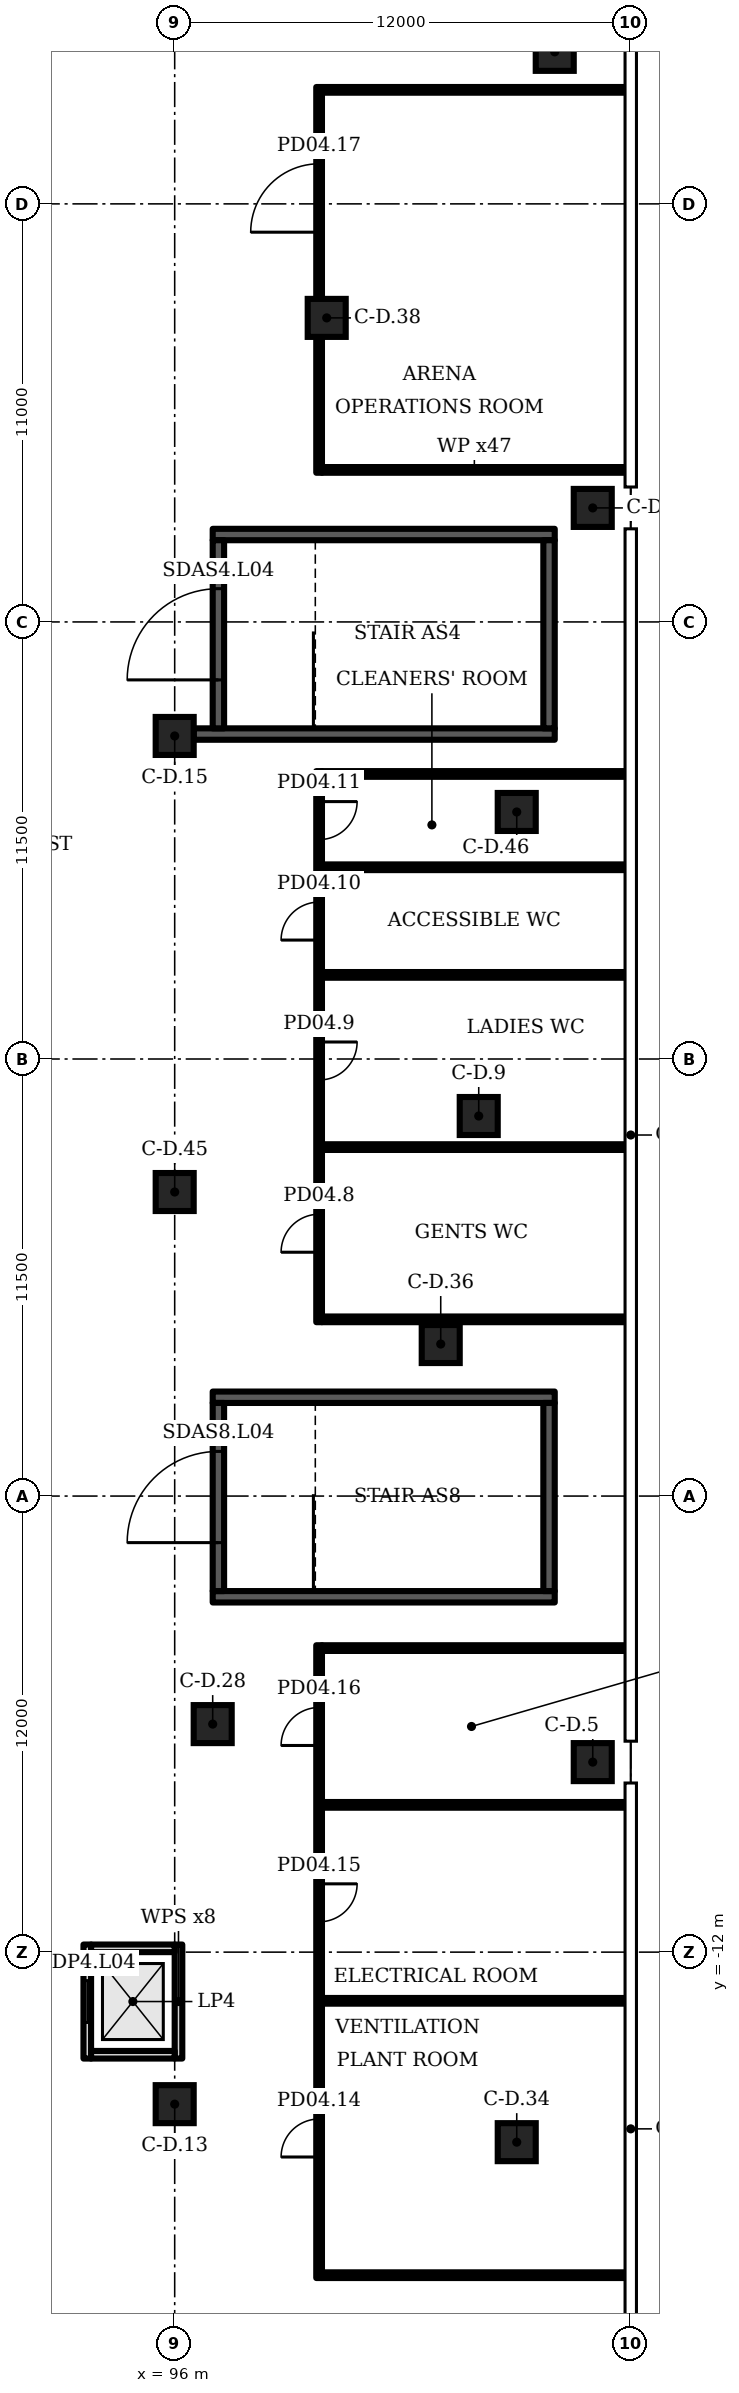
"""IFC4 building model, lengths in metres.
Left out: names, types, materials, properties, quantities, classifications, styles, units other than length and angle.
Written with IfcOpenShell. Run it as: python <this file> out.ifc"""

import sys

from ifc_helpers import new_model, si_unit, direction, frame, frame_2d, origin, origin_2d, place, context, subcontext, project, spatial, rectangle, extrude, element, fill, save


model = new_model("IFC4")
c1 = context("Model", 3, precision=1e-05, world=origin(), true_north=direction((0.0, 1.0)))
c2 = subcontext(c1, "Body", "Model", "MODEL_VIEW")
j1 = project(units=[si_unit("LENGTHUNIT", "METRE"), si_unit("PLANEANGLEUNIT", "RADIAN")], contexts=[c1])
p1 = place(None, origin())
s1 = spatial("IfcSite", under=j1, at=p1, CompositionType="ELEMENT")
p2 = place(p1, origin())
s2 = spatial("IfcBuilding", under=s1, at=p2, CompositionType="ELEMENT")
p3 = place(p2, frame((0.0, 0.0, 27.5)))
s3 = spatial("IfcBuildingStorey", under=s2, at=p3, CompositionType="ELEMENT", Elevation=27.5)
for number, where, z_axis, x_axis in (
    (1, (107.0, 26.0, 0.0), (0.0, 0.0, 1.0), (1.0, 0.0, 0.0)),
    (2, (107.0, -7.0, 0.0), (0.0, 0.0, 1.0), (1.0, 0.0, 0.0)),
    (3, (104.0, 10.0, 0.0), (0.0, 0.0, 1.0), (1.0, 0.0, 0.0)),
    (4, (96.0, -16.0, 0.0), (0.0, 0.0, 1.0), (1.0, 0.0, 0.0)),
    (5, (96.0, 20.0, 0.0), (0.0, 0.0, 1.0), (1.0, 0.0, 0.0)),
    (6, (106.0, 38.0, 0.0), (0.0, 0.0, 1.0), (1.0, 0.0, 0.0)),
    (7, (97.0, -6.0, 0.0), (0.0, 0.0, 1.0), (1.0, 0.0, 0.0)),
    (8, (105.0, -17.0, 0.0), (0.0, 0.0, 1.0), (1.0, 0.0, 0.0)),
    (9, (103.0, 4.0, 0.0), (0.0, 0.0, 1.0), (1.0, 0.0, 0.0)),
    (10, (100.0, 31.0, 0.0), (0.0, 0.0, 1.0), (1.0, 0.0, 0.0)),
    (11, (96.0, 8.0, 0.0), (0.0, 0.0, 1.0), (1.0, 0.0, 0.0)),
    (12, (105.0, 18.0, 0.0), (0.0, 0.0, 1.0), (1.0, 0.0, 0.0)),
):
    element("IfcColumn", number, at=place(p3, frame(where, z_axis=z_axis, x_axis=x_axis)), inside=s3, PredefinedType="COLUMN", context=c2, shape_type="SweptSolid", body=[
        extrude(rectangle(XDim=1.0, YDim=1.0, at=origin_2d()), origin(), (0.0, 0.0, 1.0), 5.5),
    ])
for number, where, z_axis, x_axis in (
    (13, (99.875, -20.5, 0.0), (0.0, 0.0, 1.0), (1.0, 0.0, 0.0)),
    (14, (99.875, -4.0, 0.0), (0.0, 0.0, 1.0), (1.0, 0.0, 0.0)),
    (15, (99.875, 19.0, 0.0), (0.0, 0.0, 1.0), (1.0, 0.0, 0.0)),
    (16, (99.875, 4.65, 0.0), (0.0, 0.0, 1.0), (1.0, 0.0, 0.0)),
    (17, (99.875, 9.182, 0.0), (0.0, 0.0, 1.0), (1.0, 0.0, 0.0)),
):
    element("IfcWall", number, at=place(p3, frame(where, z_axis=z_axis, x_axis=x_axis)), inside=s3, PredefinedType="PARTITIONING", context=c2, shape_type="SweptSolid", body=[
        extrude(rectangle(XDim=8.02, YDim=0.15, at=frame_2d((4.01, 0.0))), origin(), (0.0, 0.0, 1.0), 5.2),
    ])
p4 = place(p3, frame((99.8, -20.575, 0.0), z_axis=(0.0, 0.0, 1.0), x_axis=(0.0, 1.0, 0.0)))
e18 = element("IfcWall", 18, at=p4, inside=s3, PredefinedType="PARTITIONING", context=c2, shape_type="SweptSolid", body=[
    extrude(rectangle(XDim=16.65, YDim=0.15, at=frame_2d((8.325, 0.0))), origin(), (0.0, 0.0, 1.0), 5.2),
])
p5 = place(p4, frame((3.184, 0.0, 0.0)))
e19 = element("IfcOpeningElement", 19, at=p5, cuts=e18, PredefinedType="OPENING", context=c2, shape_type="SweptSolid", body=[
    extrude(rectangle(XDim=1.0, YDim=2.1, at=frame_2d((0.5, 1.05))), frame((0.0, 0.085, 0.0), z_axis=(0.0, -1.0, 0.0), x_axis=(1.0, 0.0, 0.0)), (0.0, 0.0, 1.0), 0.17),
])
p6 = place(p4, frame((9.372, 0.0, 0.0)))
e20 = element("IfcOpeningElement", 20, at=p6, cuts=e18, PredefinedType="OPENING", context=c2, shape_type="SweptSolid", body=[
    extrude(rectangle(XDim=1.0, YDim=2.1, at=frame_2d((0.5, 1.05))), frame((0.0, 0.085, 0.0), z_axis=(0.0, -1.0, 0.0), x_axis=(1.0, 0.0, 0.0)), (0.0, 0.0, 1.0), 0.17),
])
p7 = place(p4, frame((14.012, 0.0, 0.0)))
e21 = element("IfcOpeningElement", 21, at=p7, cuts=e18, PredefinedType="OPENING", context=c2, shape_type="SweptSolid", body=[
    extrude(rectangle(XDim=1.0, YDim=2.1, at=frame_2d((0.5, 1.05))), frame((0.0, 0.085, 0.0), z_axis=(0.0, -1.0, 0.0), x_axis=(1.0, 0.0, 0.0)), (0.0, 0.0, 1.0), 0.17),
])
p8 = place(p3, frame((99.8, 4.575, 0.0), z_axis=(0.0, 0.0, 1.0), x_axis=(0.0, 1.0, 0.0)))
e22 = element("IfcWall", 22, at=p8, inside=s3, PredefinedType="PARTITIONING", context=c2, shape_type="SweptSolid", body=[
    extrude(rectangle(XDim=14.5, YDim=0.15, at=frame_2d((7.25, 0.0))), origin(), (0.0, 0.0, 1.0), 5.2),
])
p9 = place(p8, frame((1.841, 0.0, 0.0)))
e23 = element("IfcOpeningElement", 23, at=p9, cuts=e22, PredefinedType="OPENING", context=c2, shape_type="SweptSolid", body=[
    extrude(rectangle(XDim=1.0, YDim=2.1, at=frame_2d((0.5, 1.05))), frame((0.0, 0.085, 0.0), z_axis=(0.0, -1.0, 0.0), x_axis=(1.0, 0.0, 0.0)), (0.0, 0.0, 1.0), 0.17),
])
p10 = place(p8, frame((6.372, 0.0, 0.0)))
e24 = element("IfcOpeningElement", 24, at=p10, cuts=e22, PredefinedType="OPENING", context=c2, shape_type="SweptSolid", body=[
    extrude(rectangle(XDim=1.0, YDim=2.1, at=frame_2d((0.5, 1.05))), frame((0.0, 0.085, 0.0), z_axis=(0.0, -1.0, 0.0), x_axis=(1.0, 0.0, 0.0)), (0.0, 0.0, 1.0), 0.17),
])
p11 = place(p8, frame((10.054, 0.0, 0.0)))
e25 = element("IfcOpeningElement", 25, at=p11, cuts=e22, PredefinedType="OPENING", context=c2, shape_type="SweptSolid", body=[
    extrude(rectangle(XDim=1.0, YDim=2.1, at=frame_2d((0.5, 1.05))), frame((0.0, 0.085, 0.0), z_axis=(0.0, -1.0, 0.0), x_axis=(1.0, 0.0, 0.0)), (0.0, 0.0, 1.0), 0.17),
])
p12 = place(p8, frame((12.698, 0.0, 0.0)))
e26 = element("IfcOpeningElement", 26, at=p12, cuts=e22, PredefinedType="OPENING", context=c2, shape_type="SweptSolid", body=[
    extrude(rectangle(XDim=1.0, YDim=2.1, at=frame_2d((0.5, 1.05))), frame((0.0, 0.085, 0.0), z_axis=(0.0, -1.0, 0.0), x_axis=(1.0, 0.0, 0.0)), (0.0, 0.0, 1.0), 0.17),
])
p13 = place(p3, frame((99.8, 26.925, 0.0), z_axis=(0.0, 0.0, 1.0), x_axis=(0.0, 1.0, 0.0)))
e27 = element("IfcWall", 27, at=p13, inside=s3, PredefinedType="PARTITIONING", context=c2, shape_type="SweptSolid", body=[
    extrude(rectangle(XDim=3.565, YDim=0.15, at=frame_2d((1.782, 0.0))), origin(), (0.0, 0.0, 1.0), 5.2),
])
p14 = place(p3, frame((99.8, 31.51, 0.0), z_axis=(0.0, 0.0, 1.0), x_axis=(0.0, 1.0, 0.0)))
e28 = element("IfcWall", 28, at=p14, inside=s3, PredefinedType="PARTITIONING", context=c2, shape_type="SweptSolid", body=[
    extrude(rectangle(XDim=5.565, YDim=0.15, at=frame_2d((2.782, 0.0))), origin(), (0.0, 0.0, 1.0), 5.2),
])
p15 = place(p14, frame((1.745, 0.0, 0.0)))
e29 = element("IfcOpeningElement", 29, at=p15, cuts=e28, PredefinedType="OPENING", context=c2, shape_type="SweptSolid", body=[
    extrude(rectangle(XDim=1.8, YDim=2.1, at=frame_2d((0.9, 1.05))), frame((0.0, 0.085, 0.0), z_axis=(0.0, -1.0, 0.0), x_axis=(1.0, 0.0, 0.0)), (0.0, 0.0, 1.0), 0.17),
])
for number, where, z_axis, x_axis in (
    (30, (99.875, 13.713, 0.0), (0.0, 0.0, 1.0), (1.0, 0.0, 0.0)),
    (31, (99.875, 16.545, 0.0), (0.0, 0.0, 1.0), (1.0, 0.0, 0.0)),
    (32, (99.875, -13.281, 0.0), (0.0, 0.0, 1.0), (1.0, 0.0, 0.0)),
    (33, (99.875, -8.125, 0.0), (0.0, 0.0, 1.0), (1.0, 0.0, 0.0)),
    (34, (99.875, 27.0, 0.0), (0.0, 0.0, 1.0), (1.0, 0.0, 0.0)),
    (35, (99.875, 37.0, 0.0), (0.0, 0.0, 1.0), (1.0, 0.0, 0.0)),
):
    element("IfcWall", number, at=place(p3, frame(where, z_axis=z_axis, x_axis=x_axis)), inside=s3, PredefinedType="PARTITIONING", context=c2, shape_type="SweptSolid", body=[
        extrude(rectangle(XDim=8.02, YDim=0.15, at=frame_2d((4.01, 0.0))), origin(), (0.0, 0.0, 1.0), 5.2),
    ])
for number, where, z_axis, x_axis in (
    (36, (97.0, -2.65, 0.0), (0.0, 0.0, 1.0), (1.0, 0.0, 0.0)),
    (37, (97.0, 2.6, 0.0), (0.0, 0.0, 1.0), (1.0, 0.0, 0.0)),
):
    element("IfcWall", number, at=place(p3, frame(where, z_axis=z_axis, x_axis=x_axis)), inside=s3, PredefinedType="SHEAR", context=c2, shape_type="SweptSolid", body=[
        extrude(rectangle(XDim=9.0, YDim=0.3, at=frame_2d((4.5, 0.0))), origin(), (0.0, 0.0, 1.0), 5.2),
    ])
p16 = place(p3, frame((97.15, -2.5, 0.0), z_axis=(0.0, 0.0, 1.0), x_axis=(0.0, 1.0, 0.0)))
e38 = element("IfcWall", 38, at=p16, inside=s3, PredefinedType="SHEAR", context=c2, shape_type="SweptSolid", body=[
    extrude(rectangle(XDim=4.95, YDim=0.3, at=frame_2d((2.475, 0.0))), origin(), (0.0, 0.0, 1.0), 5.2),
])
p17 = place(p16, frame((1.275, 0.0, 0.0)))
e39 = element("IfcOpeningElement", 39, at=p17, cuts=e38, PredefinedType="OPENING", context=c2, shape_type="SweptSolid", body=[
    extrude(rectangle(XDim=2.4, YDim=2.1, at=frame_2d((1.2, 1.05))), frame((0.0, 0.16, 0.0), z_axis=(0.0, -1.0, 0.0), x_axis=(1.0, 0.0, 0.0)), (0.0, 0.0, 1.0), 0.32),
])
p18 = place(p3, frame((105.85, -2.5, 0.0), z_axis=(0.0, 0.0, 1.0), x_axis=(0.0, 1.0, 0.0)))
e40 = element("IfcWall", 40, at=p18, inside=s3, PredefinedType="SHEAR", context=c2, shape_type="SweptSolid", body=[
    extrude(rectangle(XDim=4.95, YDim=0.3, at=frame_2d((2.475, 0.0))), origin(), (0.0, 0.0, 1.0), 5.2),
])
p19 = place(p3, frame((96.5, 20.05, 0.0), z_axis=(0.0, 0.0, 1.0), x_axis=(1.0, 0.0, 0.0)))
e41 = element("IfcWall", 41, at=p19, inside=s3, PredefinedType="SHEAR", context=c2, shape_type="SweptSolid", body=[
    extrude(rectangle(XDim=9.5, YDim=0.3, at=frame_2d((4.75, 0.0))), origin(), (0.0, 0.0, 1.0), 5.2),
])
p20 = place(p3, frame((97.0, 25.3, 0.0), z_axis=(0.0, 0.0, 1.0), x_axis=(1.0, 0.0, 0.0)))
e42 = element("IfcWall", 42, at=p20, inside=s3, PredefinedType="SHEAR", context=c2, shape_type="SweptSolid", body=[
    extrude(rectangle(XDim=9.0, YDim=0.3, at=frame_2d((4.5, 0.0))), origin(), (0.0, 0.0, 1.0), 5.2),
])
p21 = place(p3, frame((97.15, 20.2, 0.0), z_axis=(0.0, 0.0, 1.0), x_axis=(0.0, 1.0, 0.0)))
e43 = element("IfcWall", 43, at=p21, inside=s3, PredefinedType="SHEAR", context=c2, shape_type="SweptSolid", body=[
    extrude(rectangle(XDim=4.95, YDim=0.3, at=frame_2d((2.475, 0.0))), origin(), (0.0, 0.0, 1.0), 5.2),
])
p22 = place(p21, frame((1.275, 0.0, 0.0)))
e44 = element("IfcOpeningElement", 44, at=p22, cuts=e43, PredefinedType="OPENING", context=c2, shape_type="SweptSolid", body=[
    extrude(rectangle(XDim=2.4, YDim=2.1, at=frame_2d((1.2, 1.05))), frame((0.0, 0.16, 0.0), z_axis=(0.0, -1.0, 0.0), x_axis=(1.0, 0.0, 0.0)), (0.0, 0.0, 1.0), 0.32),
])
p23 = place(p3, frame((105.85, 20.2, 0.0), z_axis=(0.0, 0.0, 1.0), x_axis=(0.0, 1.0, 0.0)))
e45 = element("IfcWall", 45, at=p23, inside=s3, PredefinedType="SHEAR", context=c2, shape_type="SweptSolid", body=[
    extrude(rectangle(XDim=4.95, YDim=0.3, at=frame_2d((2.475, 0.0))), origin(), (0.0, 0.0, 1.0), 5.2),
])
p24 = place(p3, frame((93.7, -14.8, 0.0), z_axis=(0.0, 0.0, 1.0), x_axis=(0.0, 1.0, 0.0)))
e46 = element("IfcWall", 46, at=p24, inside=s3, PredefinedType="PARTITIONING", context=c2, shape_type="SweptSolid", body=[
    extrude(rectangle(XDim=3.0, YDim=0.2, at=frame_2d((1.5, 0.0))), origin(), (0.0, 0.0, 1.0), 5.2),
])
p25 = place(p24, frame((0.95, 0.0, 0.0)))
e47 = element("IfcOpeningElement", 47, at=p25, cuts=e46, PredefinedType="OPENING", context=c2, shape_type="SweptSolid", body=[
    extrude(rectangle(XDim=1.1, YDim=2.1, at=frame_2d((0.55, 1.05))), frame((0.0, 0.11, 0.0), z_axis=(0.0, -1.0, 0.0), x_axis=(1.0, 0.0, 0.0)), (0.0, 0.0, 1.0), 0.22),
])
p26 = place(p3, frame((96.1, -14.8, 0.0), z_axis=(0.0, 0.0, 1.0), x_axis=(0.0, 1.0, 0.0)))
e48 = element("IfcWall", 48, at=p26, inside=s3, PredefinedType="PARTITIONING", context=c2, shape_type="SweptSolid", body=[
    extrude(rectangle(XDim=3.0, YDim=0.2, at=frame_2d((1.5, 0.0))), origin(), (0.0, 0.0, 1.0), 5.2),
])
for number, where, z_axis, x_axis in (
    (49, (93.8, -14.7, 0.0), (0.0, 0.0, 1.0), (1.0, 0.0, 0.0)),
    (50, (93.8, -11.9, 0.0), (0.0, 0.0, 1.0), (1.0, 0.0, 0.0)),
):
    element("IfcWall", number, at=place(p3, frame(where, z_axis=z_axis, x_axis=x_axis)), inside=s3, PredefinedType="PARTITIONING", context=c2, shape_type="SweptSolid", body=[
        extrude(rectangle(XDim=2.2, YDim=0.2, at=frame_2d((1.1, 0.0))), origin(), (0.0, 0.0, 1.0), 5.2),
    ])
p27 = place(p9, origin())
e51 = element("IfcDoor", 51, at=p27, inside=s3, OperationType="SINGLE_SWING_LEFT", PredefinedType="DOOR", context=c2, shape_type="SweptSolid", body=[
    extrude(rectangle(XDim=1.0, YDim=2.1, at=frame_2d((0.5, 1.05))), frame((0.0, 0.025, 0.0), z_axis=(0.0, -1.0, 0.0), x_axis=(1.0, 0.0, 0.0)), (0.0, 0.0, 1.0), 0.05),
])
fill(e23, e51)
p28 = place(p10, origin())
e52 = element("IfcDoor", 52, at=p28, inside=s3, OperationType="SINGLE_SWING_RIGHT", PredefinedType="DOOR", context=c2, shape_type="SweptSolid", body=[
    extrude(rectangle(XDim=1.0, YDim=2.1, at=frame_2d((0.5, 1.05))), frame((0.0, 0.025, 0.0), z_axis=(0.0, -1.0, 0.0), x_axis=(1.0, 0.0, 0.0)), (0.0, 0.0, 1.0), 0.05),
])
fill(e24, e52)
p29 = place(p11, origin())
e53 = element("IfcDoor", 53, at=p29, inside=s3, OperationType="SINGLE_SWING_LEFT", PredefinedType="DOOR", context=c2, shape_type="SweptSolid", body=[
    extrude(rectangle(XDim=1.0, YDim=2.1, at=frame_2d((0.5, 1.05))), frame((0.0, 0.025, 0.0), z_axis=(0.0, -1.0, 0.0), x_axis=(1.0, 0.0, 0.0)), (0.0, 0.0, 1.0), 0.05),
])
fill(e25, e53)
p30 = place(p12, origin())
e54 = element("IfcDoor", 54, at=p30, inside=s3, OperationType="SINGLE_SWING_RIGHT", PredefinedType="DOOR", context=c2, shape_type="SweptSolid", body=[
    extrude(rectangle(XDim=1.0, YDim=2.1, at=frame_2d((0.5, 1.05))), frame((0.0, 0.025, 0.0), z_axis=(0.0, -1.0, 0.0), x_axis=(1.0, 0.0, 0.0)), (0.0, 0.0, 1.0), 0.05),
])
fill(e26, e54)
p31 = place(p5, origin())
e55 = element("IfcDoor", 55, at=p31, inside=s3, OperationType="SINGLE_SWING_LEFT", PredefinedType="DOOR", context=c2, shape_type="SweptSolid", body=[
    extrude(rectangle(XDim=1.0, YDim=2.1, at=frame_2d((0.5, 1.05))), frame((0.0, 0.025, 0.0), z_axis=(0.0, -1.0, 0.0), x_axis=(1.0, 0.0, 0.0)), (0.0, 0.0, 1.0), 0.05),
])
fill(e19, e55)
p32 = place(p6, origin())
e56 = element("IfcDoor", 56, at=p32, inside=s3, OperationType="SINGLE_SWING_RIGHT", PredefinedType="DOOR", context=c2, shape_type="SweptSolid", body=[
    extrude(rectangle(XDim=1.0, YDim=2.1, at=frame_2d((0.5, 1.05))), frame((0.0, 0.025, 0.0), z_axis=(0.0, -1.0, 0.0), x_axis=(1.0, 0.0, 0.0)), (0.0, 0.0, 1.0), 0.05),
])
fill(e20, e56)
p33 = place(p7, origin())
e57 = element("IfcDoor", 57, at=p33, inside=s3, OperationType="SINGLE_SWING_LEFT", PredefinedType="DOOR", context=c2, shape_type="SweptSolid", body=[
    extrude(rectangle(XDim=1.0, YDim=2.1, at=frame_2d((0.5, 1.05))), frame((0.0, 0.025, 0.0), z_axis=(0.0, -1.0, 0.0), x_axis=(1.0, 0.0, 0.0)), (0.0, 0.0, 1.0), 0.05),
])
fill(e21, e57)
p34 = place(p15, origin())
e58 = element("IfcDoor", 58, at=p34, inside=s3, OperationType="DOUBLE_DOOR_SINGLE_SWING", PredefinedType="DOOR", context=c2, shape_type="SweptSolid", body=[
    extrude(rectangle(XDim=1.8, YDim=2.1, at=frame_2d((0.9, 1.05))), frame((0.0, 0.025, 0.0), z_axis=(0.0, -1.0, 0.0), x_axis=(1.0, 0.0, 0.0)), (0.0, 0.0, 1.0), 0.05),
])
fill(e29, e58)
p35 = place(p17, origin())
e59 = element("IfcDoor", 59, at=p35, inside=s3, OperationType="DOUBLE_DOOR_SINGLE_SWING", PredefinedType="DOOR", context=c2, shape_type="SweptSolid", body=[
    extrude(rectangle(XDim=2.4, YDim=2.1, at=frame_2d((1.2, 1.05))), frame((0.0, 0.025, 0.0), z_axis=(0.0, -1.0, 0.0), x_axis=(1.0, 0.0, 0.0)), (0.0, 0.0, 1.0), 0.05),
])
fill(e39, e59)
p36 = place(p22, origin())
e60 = element("IfcDoor", 60, at=p36, inside=s3, OperationType="DOUBLE_DOOR_SINGLE_SWING", PredefinedType="DOOR", context=c2, shape_type="SweptSolid", body=[
    extrude(rectangle(XDim=2.4, YDim=2.1, at=frame_2d((1.2, 1.05))), frame((0.0, 0.025, 0.0), z_axis=(0.0, -1.0, 0.0), x_axis=(1.0, 0.0, 0.0)), (0.0, 0.0, 1.0), 0.05),
])
fill(e44, e60)
p37 = place(p25, origin())
e61 = element("IfcDoor", 61, at=p37, inside=s3, OperationType="DOUBLE_DOOR_SLIDING", PredefinedType="DOOR", context=c2, shape_type="SweptSolid", body=[
    extrude(rectangle(XDim=1.1, YDim=2.1, at=frame_2d((0.55, 1.05))), frame((0.0, 0.025, 0.0), z_axis=(0.0, -1.0, 0.0), x_axis=(1.0, 0.0, 0.0)), (0.0, 0.0, 1.0), 0.05),
])
fill(e47, e61)
save(model, sys.argv[1])
